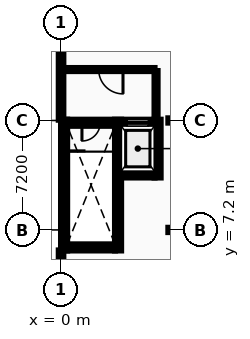
"""IFC4 building model, lengths in metres.
Left out: names, types, materials, properties, quantities, classifications, styles, units other than length and angle.
Written with IfcOpenShell. Run it as: python <this file> out.ifc"""

import sys

from ifc_helpers import new_model, si_unit, direction, frame, frame_2d, origin, origin_2d, place, context, subcontext, project, spatial, rectangle, i_section, extrude, element, fill, save


model = new_model("IFC4")
c1 = context("Model", 3, precision=1e-05, world=origin(), true_north=direction((0.0, 1.0)))
c2 = subcontext(c1, "Body", "Model", "MODEL_VIEW")
j1 = project(units=[si_unit("LENGTHUNIT", "METRE"), si_unit("PLANEANGLEUNIT", "RADIAN")], contexts=[c1])
p1 = place(None, origin())
s1 = spatial("IfcSite", under=j1, at=p1, CompositionType="ELEMENT")
p2 = place(p1, origin())
s2 = spatial("IfcBuilding", under=s1, at=p2, CompositionType="ELEMENT")
p3 = place(p2, frame((0.0, 0.0, 27.2)))
s3 = spatial("IfcBuildingStorey", under=s2, at=p3, CompositionType="ELEMENT", Elevation=27.2)
for number, where, z_axis, x_axis in (
    (1, (7.2, 7.2, 0.0), (0.0, 0.0, 1.0), (1.0, 0.0, 0.0)),
    (2, (7.2, 14.4, 0.0), (0.0, 0.0, 1.0), (1.0, 0.0, 0.0)),
):
    element("IfcColumn", number, at=place(p3, frame(where, z_axis=z_axis, x_axis=x_axis)), inside=s3, PredefinedType="COLUMN", context=c2, shape_type="SweptSolid", body=[
        extrude(i_section(OverallWidth=0.28, OverallDepth=0.28, WebThickness=0.01, FlangeThickness=0.018, FilletRadius=0.024, at=origin_2d()), origin(), (0.0, 0.0, 1.0), 4.4),
    ])
p4 = place(p3, frame((0.0, 5.85, 0.0), z_axis=(0.0, 0.0, 1.0), x_axis=(0.0, -1.0, 0.0)))
e3 = element("IfcWall", 3, at=p4, inside=s3, PredefinedType="STANDARD", context=c2, shape_type="SweptSolid", body=[
    extrude(rectangle(XDim=5.7, YDim=0.3, at=frame_2d((2.85, 0.0))), origin(), (0.0, 0.0, 1.0), 4.18),
])
p5 = place(p4, frame((2.318, 0.0, 0.95)))
e4 = element("IfcOpeningElement", 4, at=p5, cuts=e3, PredefinedType="OPENING", context=c2, shape_type="SweptSolid", body=[
    extrude(rectangle(XDim=1.064, YDim=1.26, at=frame_2d((0.532, 0.63))), frame((0.0, 0.16, 0.0), z_axis=(0.0, -1.0, 0.0), x_axis=(1.0, 0.0, 0.0)), (0.0, 0.0, 1.0), 0.32),
])
p6 = place(p3, frame((0.0, 21.6, 0.0), z_axis=(0.0, 0.0, 1.0), x_axis=(0.0, -1.0, 0.0)))
e5 = element("IfcWall", 5, at=p6, inside=s3, PredefinedType="STANDARD", context=c2, shape_type="SweptSolid", body=[
    extrude(rectangle(XDim=7.15, YDim=0.3, at=frame_2d((3.575, 0.0))), origin(), (0.0, 0.0, 1.0), 4.18),
])
p7 = place(p6, frame((1.596, 0.0, 0.95)))
e6 = element("IfcOpeningElement", 6, at=p7, cuts=e5, PredefinedType="OPENING", context=c2, shape_type="SweptSolid", body=[
    extrude(rectangle(XDim=1.098, YDim=1.26, at=frame_2d((0.549, 0.63))), frame((0.0, 0.16, 0.0), z_axis=(0.0, -1.0, 0.0), x_axis=(1.0, 0.0, 0.0)), (0.0, 0.0, 1.0), 0.32),
])
p8 = place(p6, frame((4.456, 0.0, 0.95)))
e7 = element("IfcOpeningElement", 7, at=p8, cuts=e5, PredefinedType="OPENING", context=c2, shape_type="SweptSolid", body=[
    extrude(rectangle(XDim=1.098, YDim=1.26, at=frame_2d((0.549, 0.63))), frame((0.0, 0.16, 0.0), z_axis=(0.0, -1.0, 0.0), x_axis=(1.0, 0.0, 0.0)), (0.0, 0.0, 1.0), 0.32),
])
p9 = place(p3, frame((0.4, 6.05, 0.0), z_axis=(0.0, 0.0, 1.0), x_axis=(1.0, 0.0, 0.0)))
e8 = element("IfcWall", 8, at=p9, inside=s3, PredefinedType="SHEAR", context=c2, shape_type="SweptSolid", body=[
    extrude(rectangle(XDim=3.15, YDim=0.4, at=frame_2d((1.575, 0.0))), origin(), (0.0, 0.0, 1.0), 4.18),
])
p10 = place(p3, frame((0.4, 14.25, 0.0), z_axis=(0.0, 0.0, 1.0), x_axis=(1.0, 0.0, 0.0)))
e9 = element("IfcWall", 9, at=p10, inside=s3, PredefinedType="SHEAR", context=c2, shape_type="SweptSolid", body=[
    extrude(rectangle(XDim=3.15, YDim=0.4, at=frame_2d((1.575, 0.0))), origin(), (0.0, 0.0, 1.0), 4.18),
])
p11 = place(p10, frame((0.975, 0.0, 0.0)))
e10 = element("IfcOpeningElement", 10, at=p11, cuts=e9, PredefinedType="OPENING", context=c2, shape_type="SweptSolid", body=[
    extrude(rectangle(XDim=1.2, YDim=2.15, at=frame_2d((0.6, 1.075))), frame((0.0, 0.21, 0.0), z_axis=(0.0, -1.0, 0.0), x_axis=(1.0, 0.0, 0.0)), (0.0, 0.0, 1.0), 0.42),
])
for number, where, z_axis, x_axis in (
    (11, (0.2, 5.85, 0.0), (0.0, 0.0, 1.0), (0.0, 1.0, 0.0)),
    (12, (3.75, 5.85, 0.0), (0.0, 0.0, 1.0), (0.0, 1.0, 0.0)),
):
    element("IfcWall", number, at=place(p3, frame(where, z_axis=z_axis, x_axis=x_axis)), inside=s3, PredefinedType="SHEAR", context=c2, shape_type="SweptSolid", body=[
        extrude(rectangle(XDim=8.6, YDim=0.4, at=frame_2d((4.3, 0.0))), origin(), (0.0, 0.0, 1.0), 4.18),
    ])
p12 = place(p3, frame((3.95, 10.85, 0.0), z_axis=(0.0, 0.0, 1.0), x_axis=(1.0, 0.0, 0.0)))
e13 = element("IfcWall", 13, at=p12, inside=s3, PredefinedType="SHEAR", context=c2, shape_type="SweptSolid", body=[
    extrude(rectangle(XDim=2.2, YDim=0.4, at=frame_2d((1.1, 0.0))), origin(), (0.0, 0.0, 1.0), 4.18),
])
p13 = place(p3, frame((3.95, 14.25, 0.0), z_axis=(0.0, 0.0, 1.0), x_axis=(1.0, 0.0, 0.0)))
e14 = element("IfcWall", 14, at=p13, inside=s3, PredefinedType="SHEAR", context=c2, shape_type="SweptSolid", body=[
    extrude(rectangle(XDim=2.2, YDim=0.4, at=frame_2d((1.1, 0.0))), origin(), (0.0, 0.0, 1.0), 4.18),
])
p14 = place(p13, frame((0.4, 0.0, 0.0)))
e15 = element("IfcOpeningElement", 15, at=p14, cuts=e14, PredefinedType="OPENING", context=c2, shape_type="SweptSolid", body=[
    extrude(rectangle(XDim=1.4, YDim=2.2, at=frame_2d((0.7, 1.1))), frame((0.0, 0.21, 0.0), z_axis=(0.0, -1.0, 0.0), x_axis=(1.0, 0.0, 0.0)), (0.0, 0.0, 1.0), 0.42),
])
p15 = place(p3, frame((6.35, 10.65, 0.0), z_axis=(0.0, 0.0, 1.0), x_axis=(0.0, 1.0, 0.0)))
e16 = element("IfcWall", 16, at=p15, inside=s3, PredefinedType="SHEAR", context=c2, shape_type="SweptSolid", body=[
    extrude(rectangle(XDim=3.8, YDim=0.4, at=frame_2d((1.9, 0.0))), origin(), (0.0, 0.0, 1.0), 4.18),
])
p16 = place(p3, frame((0.4, 17.75, 0.0), z_axis=(0.0, 0.0, 1.0), x_axis=(1.0, 0.0, 0.0)))
e17 = element("IfcWall", 17, at=p16, inside=s3, PredefinedType="PARTITIONING", context=c2, shape_type="SweptSolid", body=[
    extrude(rectangle(XDim=5.75, YDim=0.2, at=frame_2d((2.875, 0.0))), origin(), (0.0, 0.0, 1.0), 4.18),
])
p17 = place(p16, frame((2.075, 0.0, 0.0)))
e18 = element("IfcOpeningElement", 18, at=p17, cuts=e17, PredefinedType="OPENING", context=c2, shape_type="SweptSolid", body=[
    extrude(rectangle(XDim=1.6, YDim=2.2, at=frame_2d((0.8, 1.1))), frame((0.0, 0.11, 0.0), z_axis=(0.0, -1.0, 0.0), x_axis=(1.0, 0.0, 0.0)), (0.0, 0.0, 1.0), 0.22),
])
p18 = place(p3, frame((6.25, 14.45, 0.0), z_axis=(0.0, 0.0, 1.0), x_axis=(0.0, 1.0, 0.0)))
e19 = element("IfcWall", 19, at=p18, inside=s3, PredefinedType="PARTITIONING", context=c2, shape_type="SweptSolid", body=[
    extrude(rectangle(XDim=3.2, YDim=0.2, at=frame_2d((1.6, 0.0))), origin(), (0.0, 0.0, 1.0), 4.18),
])
p19 = place(p8, origin())
e20 = element("IfcWindow", 20, at=p19, inside=s3, PartitioningType="SINGLE_PANEL", PredefinedType="WINDOW", context=c2, shape_type="SweptSolid", body=[
    extrude(rectangle(XDim=1.098, YDim=1.26, at=frame_2d((0.549, 0.63))), frame((0.0, 0.03, 0.0), z_axis=(0.0, -1.0, 0.0), x_axis=(1.0, 0.0, 0.0)), (0.0, 0.0, 1.0), 0.06),
])
fill(e7, e20)
p20 = place(p11, frame((1.2, 0.0, 0.0), z_axis=(0.0, 0.0, 1.0), x_axis=(-1.0, 0.0, 0.0)))
e21 = element("IfcDoor", 21, at=p20, inside=s3, OperationType="SINGLE_SWING_LEFT", PredefinedType="DOOR", context=c2, shape_type="SweptSolid", body=[
    extrude(rectangle(XDim=1.2, YDim=2.15, at=frame_2d((0.6, 1.075))), frame((0.0, 0.025, 0.0), z_axis=(0.0, -1.0, 0.0), x_axis=(1.0, 0.0, 0.0)), (0.0, 0.0, 1.0), 0.05),
])
fill(e10, e21)
p21 = place(p14, origin())
e22 = element("IfcDoor", 22, at=p21, inside=s3, OperationType="SLIDING_TO_LEFT", PredefinedType="DOOR", context=c2, shape_type="SweptSolid", body=[
    extrude(rectangle(XDim=1.4, YDim=2.2, at=frame_2d((0.7, 1.1))), frame((0.0, 0.025, 0.0), z_axis=(0.0, -1.0, 0.0), x_axis=(1.0, 0.0, 0.0)), (0.0, 0.0, 1.0), 0.05),
])
fill(e15, e22)
p22 = place(p17, origin())
e23 = element("IfcDoor", 23, at=p22, inside=s3, OperationType="DOUBLE_DOOR_SINGLE_SWING", PredefinedType="DOOR", context=c2, shape_type="SweptSolid", body=[
    extrude(rectangle(XDim=1.6, YDim=2.2, at=frame_2d((0.8, 1.1))), frame((0.0, 0.025, 0.0), z_axis=(0.0, -1.0, 0.0), x_axis=(1.0, 0.0, 0.0)), (0.0, 0.0, 1.0), 0.05),
])
fill(e18, e23)
save(model, sys.argv[1])
